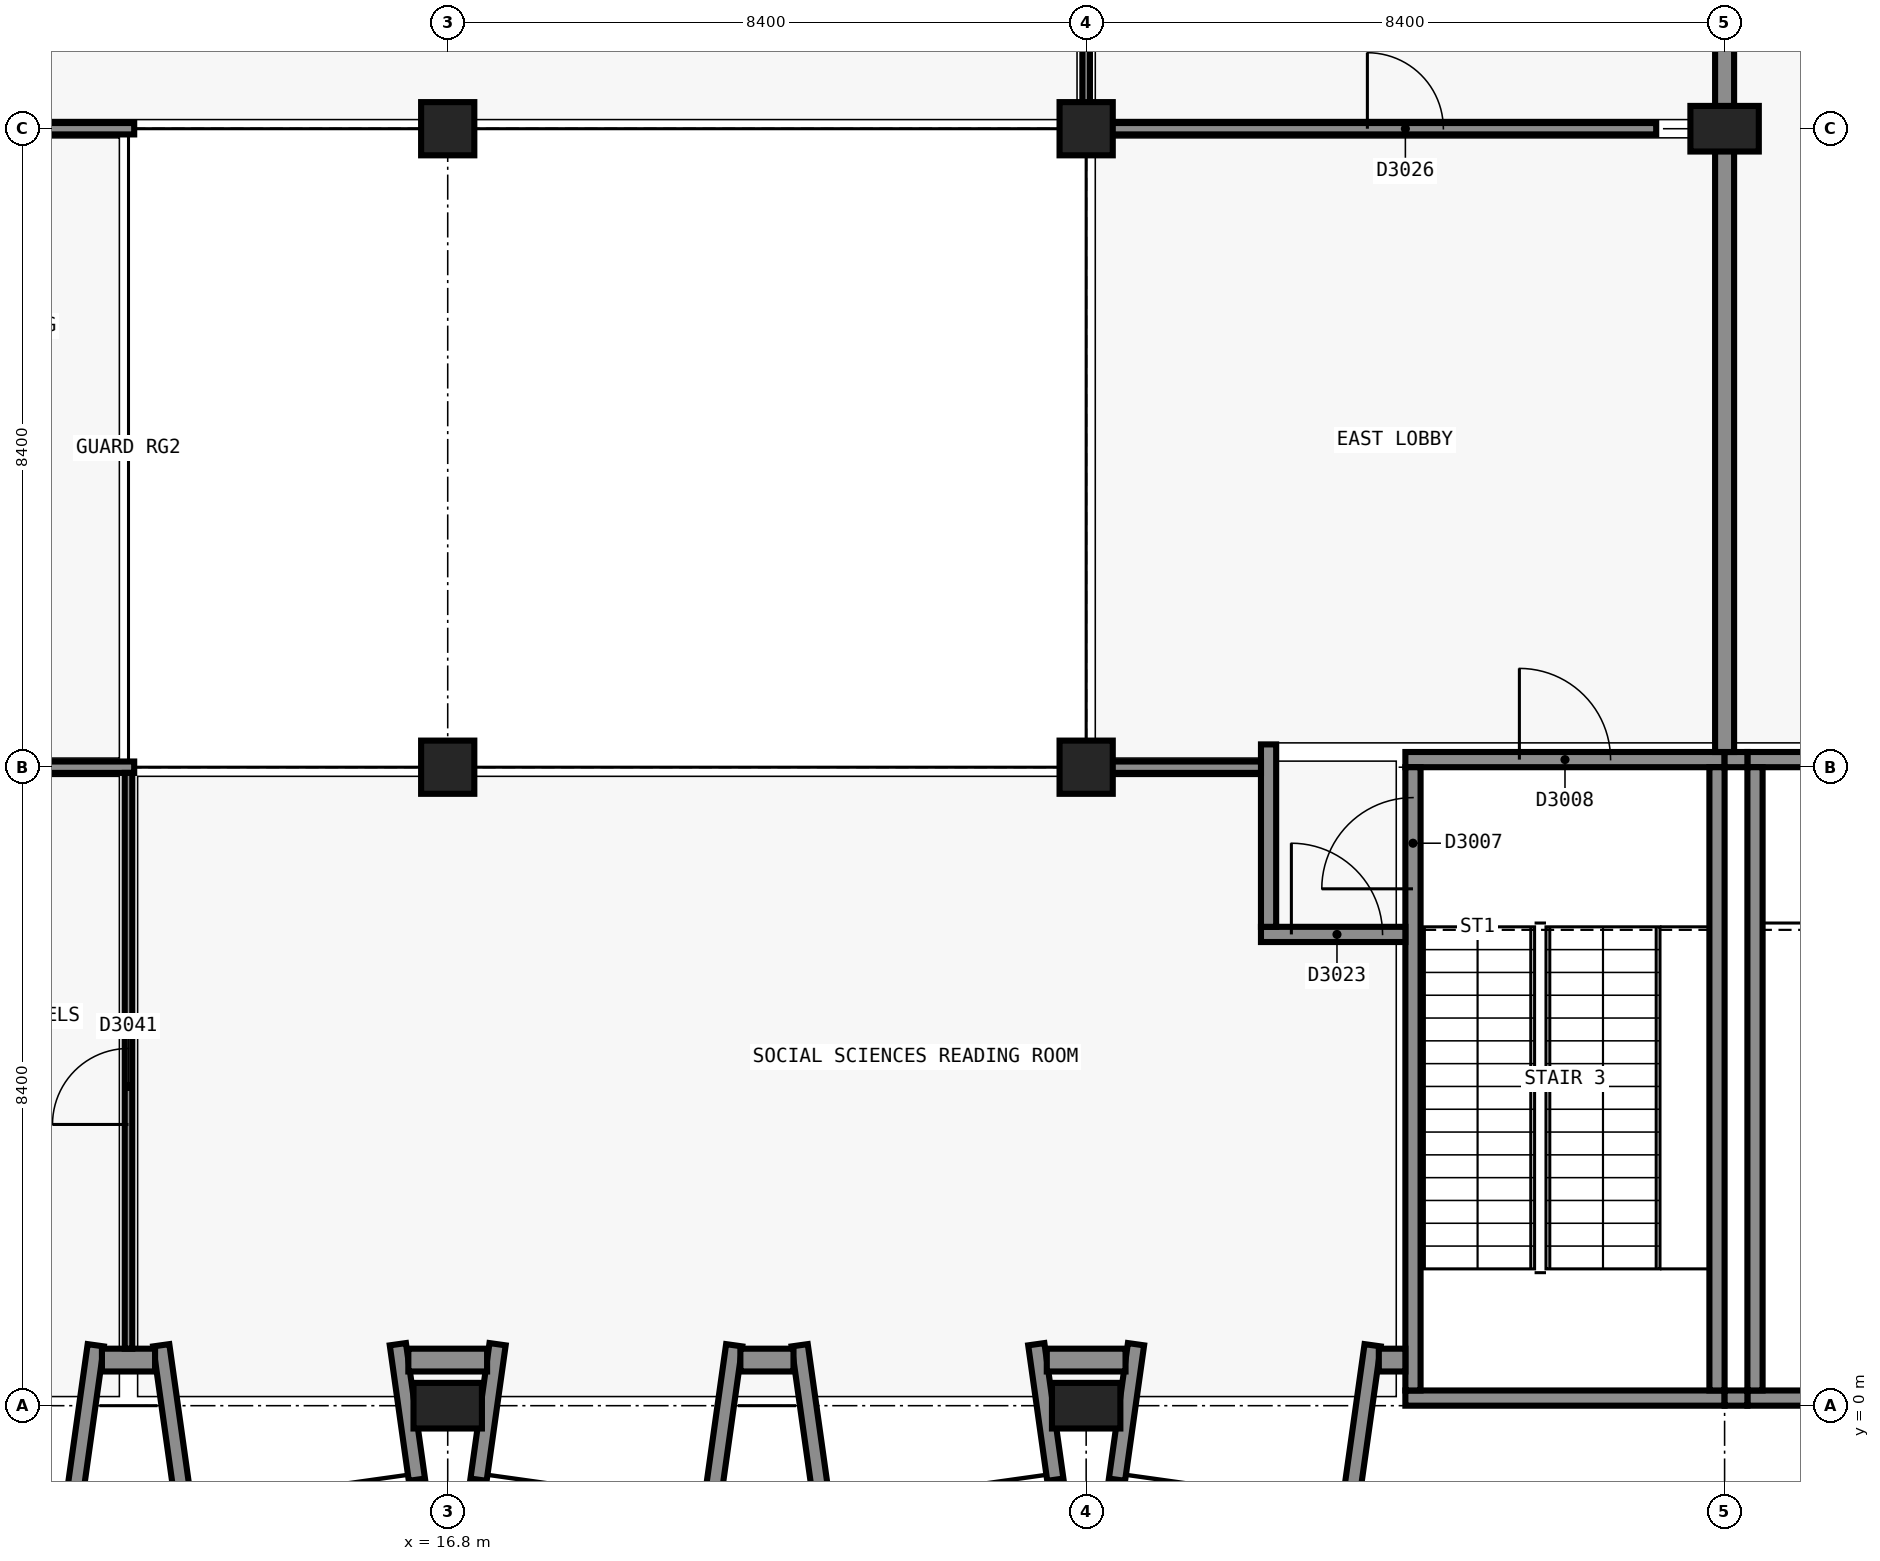
"""IFC4 building model, lengths in metres.
Left out: names, types, materials, properties, quantities, classifications, styles, units other than length and angle.
Written with IfcOpenShell. Run it as: python <this file> out.ifc"""

import sys

from ifc_helpers import new_model, si_unit, direction, frame, frame_2d, origin, origin_2d, place, context, subcontext, project, spatial, rectangle, extrude, element, fill, save


model = new_model("IFC4")
c1 = context("Model", 3, precision=1e-05, world=origin(), true_north=direction((0.0, 1.0)))
c2 = subcontext(c1, "Body", "Model", "MODEL_VIEW")
j1 = project(units=[si_unit("LENGTHUNIT", "METRE"), si_unit("PLANEANGLEUNIT", "RADIAN")], contexts=[c1])
p1 = place(None, origin())
s1 = spatial("IfcSite", under=j1, at=p1, CompositionType="ELEMENT")
p2 = place(p1, origin())
s2 = spatial("IfcBuilding", under=s1, at=p2, CompositionType="ELEMENT")
p3 = place(p2, frame((0.0, 0.0, 15.0)))
s3 = spatial("IfcBuildingStorey", under=s2, at=p3, CompositionType="ELEMENT", Elevation=15.0)
p4 = place(p3, frame((33.6, 0.1, 0.0), z_axis=(0.0, 0.0, 1.0), x_axis=(-1.0, 0.0, 0.0)))
e1 = element("IfcWall", 1, at=p4, inside=s3, PredefinedType="SHEAR", context=c2, shape_type="SweptSolid", body=[
    extrude(rectangle(XDim=4.2, YDim=0.2, at=frame_2d((2.1, 0.0))), origin(), (0.0, 0.0, 1.0), 4.8),
])
p5 = place(p3, frame((29.4, 8.5, 0.0), z_axis=(0.0, 0.0, 1.0), x_axis=(1.0, 0.0, 0.0)))
e2 = element("IfcWall", 2, at=p5, inside=s3, PredefinedType="SHEAR", context=c2, shape_type="SweptSolid", body=[
    extrude(rectangle(XDim=4.2, YDim=0.2, at=frame_2d((2.1, 0.0))), origin(), (0.0, 0.0, 1.0), 4.8),
])
p6 = place(p5, frame((1.5, 0.0, 0.0)))
e3 = element("IfcOpeningElement", 3, at=p6, cuts=e2, PredefinedType="OPENING", context=c2, shape_type="SweptSolid", body=[
    extrude(rectangle(XDim=1.2, YDim=2.1, at=frame_2d((0.6, 1.05))), frame((0.0, 0.11, 0.0), z_axis=(0.0, -1.0, 0.0), x_axis=(1.0, 0.0, 0.0)), (0.0, 0.0, 1.0), 0.22),
])
p7 = place(p3, frame((29.5, 0.2, 0.0), z_axis=(0.0, 0.0, 1.0), x_axis=(0.0, 1.0, 0.0)))
e4 = element("IfcWall", 4, at=p7, inside=s3, PredefinedType="SHEAR", context=c2, shape_type="SweptSolid", body=[
    extrude(rectangle(XDim=8.2, YDim=0.2, at=frame_2d((4.1, 0.0))), origin(), (0.0, 0.0, 1.0), 4.8),
])
p8 = place(p7, frame((6.6, 0.0, 0.0)))
e5 = element("IfcOpeningElement", 5, at=p8, cuts=e4, PredefinedType="OPENING", context=c2, shape_type="SweptSolid", body=[
    extrude(rectangle(XDim=1.2, YDim=2.1, at=frame_2d((0.6, 1.05))), frame((0.0, 0.11, 0.0), z_axis=(0.0, -1.0, 0.0), x_axis=(1.0, 0.0, 0.0)), (0.0, 0.0, 1.0), 0.22),
])
p9 = place(p3, frame((33.5, 8.4, 0.0), z_axis=(0.0, 0.0, 1.0), x_axis=(0.0, -1.0, 0.0)))
e6 = element("IfcWall", 6, at=p9, inside=s3, PredefinedType="SHEAR", context=c2, shape_type="SweptSolid", body=[
    extrude(rectangle(XDim=8.2, YDim=0.2, at=frame_2d((4.1, 0.0))), origin(), (0.0, 0.0, 1.0), 4.8),
])
p10 = place(p3, frame((37.8, 0.1, 0.0), z_axis=(0.0, 0.0, 1.0), x_axis=(-1.0, 0.0, 0.0)))
e7 = element("IfcWall", 7, at=p10, inside=s3, PredefinedType="SHEAR", context=c2, shape_type="SweptSolid", body=[
    extrude(rectangle(XDim=3.9, YDim=0.2, at=frame_2d((1.95, 0.0))), origin(), (0.0, 0.0, 1.0), 4.8),
])
p11 = place(p3, frame((33.9, 8.5, 0.0), z_axis=(0.0, 0.0, 1.0), x_axis=(1.0, 0.0, 0.0)))
e8 = element("IfcWall", 8, at=p11, inside=s3, PredefinedType="SHEAR", context=c2, shape_type="SweptSolid", body=[
    extrude(rectangle(XDim=3.9, YDim=0.2, at=frame_2d((1.95, 0.0))), origin(), (0.0, 0.0, 1.0), 4.8),
])
p12 = place(p11, frame((1.2, 0.0, 0.0)))
e9 = element("IfcOpeningElement", 9, at=p12, cuts=e8, PredefinedType="OPENING", context=c2, shape_type="SweptSolid", body=[
    extrude(rectangle(XDim=1.2, YDim=2.1, at=frame_2d((0.6, 1.05))), frame((0.0, 0.11, 0.0), z_axis=(0.0, -1.0, 0.0), x_axis=(1.0, 0.0, 0.0)), (0.0, 0.0, 1.0), 0.22),
])
p13 = place(p3, frame((34.0, 0.2, 0.0), z_axis=(0.0, 0.0, 1.0), x_axis=(0.0, 1.0, 0.0)))
e10 = element("IfcWall", 10, at=p13, inside=s3, PredefinedType="SHEAR", context=c2, shape_type="SweptSolid", body=[
    extrude(rectangle(XDim=8.2, YDim=0.2, at=frame_2d((4.1, 0.0))), origin(), (0.0, 0.0, 1.0), 4.8),
])
p14 = place(p3, frame((16.8, 0.0, 0.0), z_axis=(0.0, 0.0, 1.0), x_axis=(1.0, 0.0, 0.0)))
e11 = element("IfcColumn", 11, at=p14, inside=s3, PredefinedType="COLUMN", context=c2, shape_type="SweptSolid", body=[
    extrude(rectangle(XDim=0.9, YDim=0.6, at=origin_2d()), origin(), (0.0, 0.0, 1.0), 4.8),
])
for number, where, z_axis, x_axis in (
    (12, (16.8, 8.4, 0.0), (0.0, 0.0, 1.0), (1.0, 0.0, 0.0)),
    (13, (16.8, 16.8, 0.0), (0.0, 0.0, 1.0), (1.0, 0.0, 0.0)),
):
    element("IfcColumn", number, at=place(p3, frame(where, z_axis=z_axis, x_axis=x_axis)), inside=s3, PredefinedType="COLUMN", context=c2, shape_type="SweptSolid", body=[
        extrude(rectangle(XDim=0.7, YDim=0.7, at=origin_2d()), origin(), (0.0, 0.0, 1.0), 4.8),
    ])
p15 = place(p3, frame((25.2, 0.0, 0.0), z_axis=(0.0, 0.0, 1.0), x_axis=(1.0, 0.0, 0.0)))
e14 = element("IfcColumn", 14, at=p15, inside=s3, PredefinedType="COLUMN", context=c2, shape_type="SweptSolid", body=[
    extrude(rectangle(XDim=0.9, YDim=0.6, at=origin_2d()), origin(), (0.0, 0.0, 1.0), 4.8),
])
for number, where, z_axis, x_axis in (
    (15, (25.2, 8.4, 0.0), (0.0, 0.0, 1.0), (1.0, 0.0, 0.0)),
    (16, (25.2, 16.8, 0.0), (0.0, 0.0, 1.0), (1.0, 0.0, 0.0)),
):
    element("IfcColumn", number, at=place(p3, frame(where, z_axis=z_axis, x_axis=x_axis)), inside=s3, PredefinedType="COLUMN", context=c2, shape_type="SweptSolid", body=[
        extrude(rectangle(XDim=0.7, YDim=0.7, at=origin_2d()), origin(), (0.0, 0.0, 1.0), 4.8),
    ])
p16 = place(p3, frame((33.6, 16.8, 0.0), z_axis=(0.0, 0.0, 1.0), x_axis=(0.0, 1.0, 0.0)))
e17 = element("IfcColumn", 17, at=p16, inside=s3, PredefinedType="COLUMN", context=c2, shape_type="SweptSolid", body=[
    extrude(rectangle(XDim=0.9, YDim=0.6, at=origin_2d()), origin(), (0.0, 0.0, 1.0), 4.8),
])
for number, where, z_axis, x_axis in (
    (18, (33.9, 0.1, 0.0), (0.0, 0.0, 1.0), (-1.0, 0.0, 0.0)),
    (19, (33.6, 8.5, 0.0), (0.0, 0.0, 1.0), (1.0, 0.0, 0.0)),
):
    element("IfcWall", number, at=place(p3, frame(where, z_axis=z_axis, x_axis=x_axis)), inside=s3, PredefinedType="SHEAR", context=c2, shape_type="SweptSolid", body=[
        extrude(rectangle(XDim=0.3, YDim=0.2, at=frame_2d((0.15, 0.0))), origin(), (0.0, 0.0, 1.0), 4.8),
    ])
p17 = place(p3, frame((12.169, 0.795, 0.0), z_axis=(0.0, 0.0, 1.0), x_axis=(-0.139141913905, -0.990272451295, 0.0)))
e20 = element("IfcWall", 20, at=p17, inside=s3, PredefinedType="SOLIDWALL", context=c2, shape_type="SweptSolid", body=[
    extrude(rectangle(XDim=2.219, YDim=0.215, at=frame_2d((1.11, 0.0))), origin(), (0.0, 0.0, 1.0), 4.5),
])
p18 = place(p3, frame((13.031, 0.795, 0.0), z_axis=(0.0, 0.0, 1.0), x_axis=(0.139249775508, -0.99025728981, 0.0)))
e21 = element("IfcWall", 21, at=p18, inside=s3, PredefinedType="SOLIDWALL", context=c2, shape_type="SweptSolid", body=[
    extrude(rectangle(XDim=2.22, YDim=0.215, at=frame_2d((1.11, 0.0))), origin(), (0.0, 0.0, 1.0), 4.5),
])
for number, where, z_axis, x_axis in (
    (22, (16.144, 0.809, 0.0), (0.0, 0.0, 1.0), (0.139, -0.99, 0.0)),
    (23, (17.456, 0.809, 0.0), (0.0, 0.0, 1.0), (-0.139, -0.99, 0.0)),
):
    element("IfcWall", number, at=place(p3, frame(where, z_axis=z_axis, x_axis=x_axis)), inside=s3, PredefinedType="SOLIDWALL", context=c2, shape_type="SweptSolid", body=[
        extrude(rectangle(XDim=1.8, YDim=0.215, at=frame_2d((0.9, 0.0))), origin(), (0.0, 0.0, 1.0), 4.5),
    ])
for number, where, z_axis, x_axis in (
    (24, (20.569, 0.795, 0.0), (0.0, 0.0, 1.0), (-0.139, -0.99, 0.0)),
    (25, (21.431, 0.795, 0.0), (0.0, 0.0, 1.0), (0.139, -0.99, 0.0)),
):
    element("IfcWall", number, at=place(p3, frame(where, z_axis=z_axis, x_axis=x_axis)), inside=s3, PredefinedType="SOLIDWALL", context=c2, shape_type="SweptSolid", body=[
        extrude(rectangle(XDim=2.219, YDim=0.215, at=frame_2d((1.11, 0.0))), origin(), (0.0, 0.0, 1.0), 4.5),
    ])
for number, where, z_axis, x_axis in (
    (26, (24.544, 0.809, 0.0), (0.0, 0.0, 1.0), (0.139, -0.99, 0.0)),
    (27, (25.856, 0.809, 0.0), (0.0, 0.0, 1.0), (-0.139, -0.99, 0.0)),
):
    element("IfcWall", number, at=place(p3, frame(where, z_axis=z_axis, x_axis=x_axis)), inside=s3, PredefinedType="SOLIDWALL", context=c2, shape_type="SweptSolid", body=[
        extrude(rectangle(XDim=1.8, YDim=0.215, at=frame_2d((0.9, 0.0))), origin(), (0.0, 0.0, 1.0), 4.5),
    ])
p19 = place(p3, frame((28.969, 0.795, 0.0), z_axis=(0.0, 0.0, 1.0), x_axis=(-0.139249775508, -0.99025728981, 0.0)))
e28 = element("IfcWall", 28, at=p19, inside=s3, PredefinedType="SOLIDWALL", context=c2, shape_type="SweptSolid", body=[
    extrude(rectangle(XDim=2.22, YDim=0.215, at=frame_2d((1.11, 0.0))), origin(), (0.0, 0.0, 1.0), 4.5),
])
p20 = place(p3, frame((12.949, 0.6, 0.0), z_axis=(0.0, 0.0, 1.0), x_axis=(-1.0, 0.0, 0.0)))
e29 = element("IfcWall", 29, at=p20, inside=s3, PredefinedType="SOLIDWALL", context=c2, shape_type="SweptSolid", body=[
    extrude(rectangle(XDim=0.699, YDim=0.3, at=frame_2d((0.35, 0.0))), origin(), (0.0, 0.0, 1.0), 4.5),
])
p21 = place(p3, frame((17.318, 0.6, 0.0), z_axis=(0.0, 0.0, 1.0), x_axis=(-1.0, 0.0, 0.0)))
e30 = element("IfcWall", 30, at=p21, inside=s3, PredefinedType="SOLIDWALL", context=c2, shape_type="SweptSolid", body=[
    extrude(rectangle(XDim=1.036, YDim=0.3, at=frame_2d((0.518, 0.0))), origin(), (0.0, 0.0, 1.0), 4.5),
])
p22 = place(p3, frame((21.35, 0.6, 0.0), z_axis=(0.0, 0.0, 1.0), x_axis=(-1.0, 0.0, 0.0)))
e31 = element("IfcWall", 31, at=p22, inside=s3, PredefinedType="SOLIDWALL", context=c2, shape_type="SweptSolid", body=[
    extrude(rectangle(XDim=0.699, YDim=0.3, at=frame_2d((0.35, 0.0))), origin(), (0.0, 0.0, 1.0), 4.5),
])
p23 = place(p3, frame((25.718, 0.6, 0.0), z_axis=(0.0, 0.0, 1.0), x_axis=(-1.0, 0.0, 0.0)))
e32 = element("IfcWall", 32, at=p23, inside=s3, PredefinedType="SOLIDWALL", context=c2, shape_type="SweptSolid", body=[
    extrude(rectangle(XDim=1.036, YDim=0.3, at=frame_2d((0.518, 0.0))), origin(), (0.0, 0.0, 1.0), 4.5),
])
p24 = place(p3, frame((29.4, 0.6, 0.0), z_axis=(0.0, 0.0, 1.0), x_axis=(-1.0, 0.0, 0.0)))
e33 = element("IfcWall", 33, at=p24, inside=s3, PredefinedType="SOLIDWALL", context=c2, shape_type="SweptSolid", body=[
    extrude(rectangle(XDim=0.349, YDim=0.3, at=frame_2d((0.175, 0.0))), origin(), (0.0, 0.0, 1.0), 4.5),
])
p25 = place(p3, frame((33.6, 8.6, 0.0), z_axis=(0.0, 0.0, 1.0), x_axis=(0.0, 1.0, 0.0)))
e34 = element("IfcWall", 34, at=p25, inside=s3, PredefinedType="SOLIDWALL", context=c2, shape_type="SweptSolid", body=[
    extrude(rectangle(XDim=15.85, YDim=0.25, at=frame_2d((7.925, 0.0))), origin(), (0.0, 0.0, 1.0), 3.8),
])
p26 = place(p3, frame((27.5, 6.2, 0.0), z_axis=(0.0, 0.0, 1.0), x_axis=(1.0, 0.0, 0.0)))
e35 = element("IfcWall", 35, at=p26, inside=s3, PredefinedType="SOLIDWALL", context=c2, shape_type="SweptSolid", body=[
    extrude(rectangle(XDim=1.9, YDim=0.2, at=frame_2d((0.95, 0.0))), origin(), (0.0, 0.0, 1.0), 4.5),
])
p27 = place(p26, frame((0.4, 0.0, 0.0)))
e36 = element("IfcOpeningElement", 36, at=p27, cuts=e35, PredefinedType="OPENING", context=c2, shape_type="SweptSolid", body=[
    extrude(rectangle(XDim=1.2, YDim=2.1, at=frame_2d((0.6, 1.05))), frame((0.0, 0.11, 0.0), z_axis=(0.0, -1.0, 0.0), x_axis=(1.0, 0.0, 0.0)), (0.0, 0.0, 1.0), 0.22),
])
p28 = place(p3, frame((27.6, 6.3, 0.0), z_axis=(0.0, 0.0, 1.0), x_axis=(0.0, 1.0, 0.0)))
e37 = element("IfcWall", 37, at=p28, inside=s3, PredefinedType="SOLIDWALL", context=c2, shape_type="SweptSolid", body=[
    extrude(rectangle(XDim=2.4, YDim=0.2, at=frame_2d((1.2, 0.0))), origin(), (0.0, 0.0, 1.0), 4.0),
])
p29 = place(p3, frame((8.325, 8.4, 0.0), z_axis=(0.0, 0.0, 1.0), x_axis=(1.0, 0.0, 0.0)))
e38 = element("IfcWall", 38, at=p29, inside=s3, PredefinedType="PARTITIONING", context=c2, shape_type="SweptSolid", body=[
    extrude(rectangle(XDim=4.35, YDim=0.15, at=frame_2d((2.175, 0.0))), origin(), (0.0, 0.0, 1.0), 3.8),
])
p30 = place(p29, frame((1.675, 0.0, 0.0)))
e39 = element("IfcOpeningElement", 39, at=p30, cuts=e38, PredefinedType="OPENING", context=c2, shape_type="SweptSolid", body=[
    extrude(rectangle(XDim=1.0, YDim=2.1, at=frame_2d((0.5, 1.05))), frame((0.0, 0.085, 0.0), z_axis=(0.0, -1.0, 0.0), x_axis=(1.0, 0.0, 0.0)), (0.0, 0.0, 1.0), 0.17),
])
p31 = place(p3, frame((25.125, 8.4, 0.0), z_axis=(0.0, 0.0, 1.0), x_axis=(1.0, 0.0, 0.0)))
e40 = element("IfcWall", 40, at=p31, inside=s3, PredefinedType="PARTITIONING", context=c2, shape_type="SweptSolid", body=[
    extrude(rectangle(XDim=2.375, YDim=0.15, at=frame_2d((1.188, 0.0))), origin(), (0.0, 0.0, 1.0), 3.8),
])
p32 = place(p3, frame((8.325, 16.8, 0.0), z_axis=(0.0, 0.0, 1.0), x_axis=(1.0, 0.0, 0.0)))
e41 = element("IfcWall", 41, at=p32, inside=s3, PredefinedType="PARTITIONING", context=c2, shape_type="SweptSolid", body=[
    extrude(rectangle(XDim=4.35, YDim=0.15, at=frame_2d((2.175, 0.0))), origin(), (0.0, 0.0, 1.0), 3.8),
])
p33 = place(p32, frame((1.675, 0.0, 0.0)))
e42 = element("IfcOpeningElement", 42, at=p33, cuts=e41, PredefinedType="OPENING", context=c2, shape_type="SweptSolid", body=[
    extrude(rectangle(XDim=1.0, YDim=2.1, at=frame_2d((0.5, 1.05))), frame((0.0, 0.085, 0.0), z_axis=(0.0, -1.0, 0.0), x_axis=(1.0, 0.0, 0.0)), (0.0, 0.0, 1.0), 0.17),
])
p34 = place(p3, frame((25.125, 16.8, 0.0), z_axis=(0.0, 0.0, 1.0), x_axis=(1.0, 0.0, 0.0)))
e43 = element("IfcWall", 43, at=p34, inside=s3, PredefinedType="PARTITIONING", context=c2, shape_type="SweptSolid", body=[
    extrude(rectangle(XDim=7.575, YDim=0.15, at=frame_2d((3.788, 0.0))), origin(), (0.0, 0.0, 1.0), 3.8),
])
p35 = place(p34, frame((3.775, 0.0, 0.0)))
e44 = element("IfcOpeningElement", 44, at=p35, cuts=e43, PredefinedType="OPENING", context=c2, shape_type="SweptSolid", body=[
    extrude(rectangle(XDim=1.0, YDim=2.1, at=frame_2d((0.5, 1.05))), frame((0.0, 0.085, 0.0), z_axis=(0.0, -1.0, 0.0), x_axis=(1.0, 0.0, 0.0)), (0.0, 0.0, 1.0), 0.17),
])
p36 = place(p3, frame((12.6, 0.75, 0.0), z_axis=(0.0, 0.0, 1.0), x_axis=(0.0, 1.0, 0.0)))
e45 = element("IfcWall", 45, at=p36, inside=s3, PredefinedType="PARTITIONING", context=c2, shape_type="SweptSolid", body=[
    extrude(rectangle(XDim=7.575, YDim=0.1, at=frame_2d((3.788, 0.0))), origin(), (0.0, 0.0, 1.0), 3.8),
])
p37 = place(p36, frame((2.95, 0.0, 0.0)))
e46 = element("IfcOpeningElement", 46, at=p37, cuts=e45, PredefinedType="OPENING", context=c2, shape_type="SweptSolid", body=[
    extrude(rectangle(XDim=1.0, YDim=2.1, at=frame_2d((0.5, 1.05))), frame((0.0, 0.06, 0.0), z_axis=(0.0, -1.0, 0.0), x_axis=(1.0, 0.0, 0.0)), (0.0, 0.0, 1.0), 0.12),
])
p38 = place(p3, frame((25.2, 16.875, 0.0), z_axis=(0.0, 0.0, 1.0), x_axis=(0.0, 1.0, 0.0)))
e47 = element("IfcWall", 47, at=p38, inside=s3, PredefinedType="PARTITIONING", context=c2, shape_type="SweptSolid", body=[
    extrude(rectangle(XDim=7.575, YDim=0.1, at=frame_2d((3.788, 0.0))), origin(), (0.0, 0.0, 1.0), 3.8),
])
p39 = place(p8, origin())
e48 = element("IfcDoor", 48, at=p39, inside=s3, OperationType="SINGLE_SWING_RIGHT", PredefinedType="DOOR", context=c2, shape_type="SweptSolid", body=[
    extrude(rectangle(XDim=1.2, YDim=2.1, at=frame_2d((0.6, 1.05))), frame((0.0, 0.025, 0.0), z_axis=(0.0, -1.0, 0.0), x_axis=(1.0, 0.0, 0.0)), (0.0, 0.0, 1.0), 0.05),
])
fill(e5, e48)
p40 = place(p6, origin())
e49 = element("IfcDoor", 49, at=p40, inside=s3, OperationType="SINGLE_SWING_RIGHT", PredefinedType="DOOR", context=c2, shape_type="SweptSolid", body=[
    extrude(rectangle(XDim=1.2, YDim=2.1, at=frame_2d((0.6, 1.05))), frame((0.0, 0.025, 0.0), z_axis=(0.0, -1.0, 0.0), x_axis=(1.0, 0.0, 0.0)), (0.0, 0.0, 1.0), 0.05),
])
fill(e3, e49)
p41 = place(p27, origin())
e50 = element("IfcDoor", 50, at=p41, inside=s3, OperationType="SINGLE_SWING_RIGHT", PredefinedType="DOOR", context=c2, shape_type="SweptSolid", body=[
    extrude(rectangle(XDim=1.2, YDim=2.1, at=frame_2d((0.6, 1.05))), frame((0.0, 0.025, 0.0), z_axis=(0.0, -1.0, 0.0), x_axis=(1.0, 0.0, 0.0)), (0.0, 0.0, 1.0), 0.05),
])
fill(e36, e50)
p42 = place(p35, origin())
e51 = element("IfcDoor", 51, at=p42, inside=s3, OperationType="SINGLE_SWING_LEFT", PredefinedType="DOOR", context=c2, shape_type="SweptSolid", body=[
    extrude(rectangle(XDim=1.0, YDim=2.1, at=frame_2d((0.5, 1.05))), frame((0.0, 0.025, 0.0), z_axis=(0.0, -1.0, 0.0), x_axis=(1.0, 0.0, 0.0)), (0.0, 0.0, 1.0), 0.05),
])
fill(e44, e51)
p43 = place(p37, origin())
e52 = element("IfcDoor", 52, at=p43, inside=s3, OperationType="SINGLE_SWING_RIGHT", PredefinedType="DOOR", context=c2, shape_type="SweptSolid", body=[
    extrude(rectangle(XDim=1.0, YDim=2.1, at=frame_2d((0.5, 1.05))), frame((0.0, 0.025, 0.0), z_axis=(0.0, -1.0, 0.0), x_axis=(1.0, 0.0, 0.0)), (0.0, 0.0, 1.0), 0.05),
])
fill(e46, e52)
save(model, sys.argv[1])
